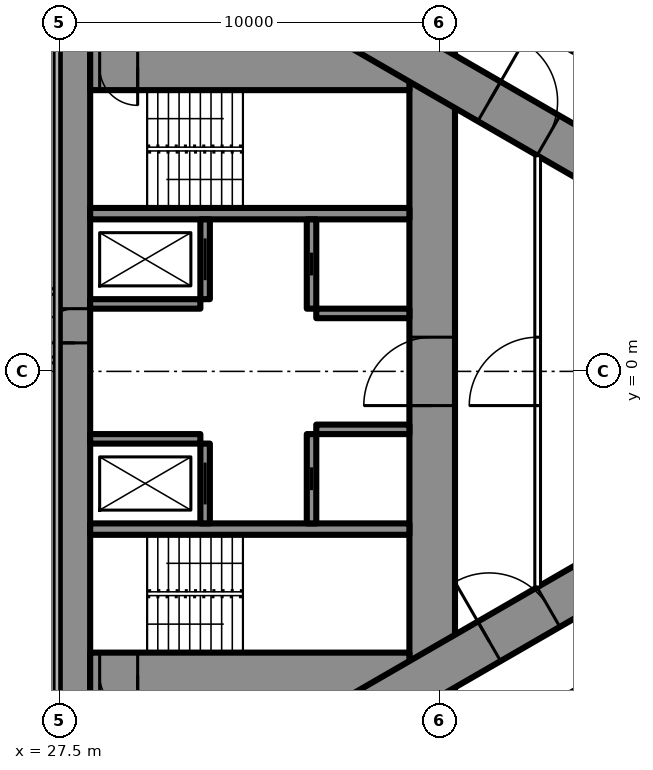
"""IFC4 building model, lengths in metres.
Left out: names, types, materials, properties, quantities, classifications, styles, units other than length and angle.
Written with IfcOpenShell. Run it as: python <this file> out.ifc"""

import sys

from ifc_helpers import new_model, si_unit, direction, frame, frame_2d, origin, place, context, subcontext, project, spatial, rectangle, extrude, element, fill, save


model = new_model("IFC4")
c1 = context("Model", 3, precision=1e-05, world=origin(), true_north=direction((0.0, 1.0)))
c2 = subcontext(c1, "Body", "Model", "MODEL_VIEW")
j1 = project(units=[si_unit("LENGTHUNIT", "METRE"), si_unit("PLANEANGLEUNIT", "RADIAN")], contexts=[c1])
p1 = place(None, origin())
s1 = spatial("IfcSite", under=j1, at=p1, CompositionType="ELEMENT")
p2 = place(p1, origin())
s2 = spatial("IfcBuilding", under=s1, at=p2, CompositionType="ELEMENT")
p3 = place(p2, frame((0.0, 0.0, 226.1)))
s3 = spatial("IfcBuildingStorey", under=s2, at=p3, CompositionType="ELEMENT", Elevation=226.1)
p4 = place(p3, frame((27.9, -8.6, 0.0), z_axis=(0.0, 0.0, 1.0), x_axis=(0.0, 1.0, 0.0)))
e1 = element("IfcWall", 1, at=p4, inside=s3, PredefinedType="SHEAR", context=c2, shape_type="SweptSolid", body=[
    extrude(rectangle(XDim=17.2, YDim=0.8, at=frame_2d((8.6, 0.0))), origin(), (0.0, 0.0, 1.0), 3.6),
])
p5 = place(p4, frame((9.35, 0.0, 0.0)))
e2 = element("IfcOpeningElement", 2, at=p5, cuts=e1, PredefinedType="OPENING", context=c2, shape_type="SweptSolid", body=[
    extrude(rectangle(XDim=0.9, YDim=2.2, at=frame_2d((0.45, 1.1))), frame((0.0, 0.41, 0.0), z_axis=(0.0, -1.0, 0.0), x_axis=(1.0, 0.0, 0.0)), (0.0, 0.0, 1.0), 0.82),
])
p6 = place(p3, frame((37.3, -8.6, 0.0), z_axis=(0.0, 0.0, 1.0), x_axis=(0.0, 1.0, 0.0)))
e3 = element("IfcWall", 3, at=p6, inside=s3, PredefinedType="SHEAR", context=c2, shape_type="SweptSolid", body=[
    extrude(rectangle(XDim=17.2, YDim=1.2, at=frame_2d((8.6, 0.0))), origin(), (0.0, 0.0, 1.0), 3.6),
])
p7 = place(p6, frame((7.7, 0.0, 0.0)))
e4 = element("IfcOpeningElement", 4, at=p7, cuts=e3, PredefinedType="OPENING", context=c2, shape_type="SweptSolid", body=[
    extrude(rectangle(XDim=1.8, YDim=2.2, at=frame_2d((0.9, 1.1))), frame((0.0, 0.61, 0.0), z_axis=(0.0, -1.0, 0.0), x_axis=(1.0, 0.0, 0.0)), (0.0, 0.0, 1.0), 1.22),
])
p8 = place(p3, frame((28.3, -8.0, 0.0), z_axis=(0.0, 0.0, 1.0), x_axis=(1.0, 0.0, 0.0)))
e5 = element("IfcWall", 5, at=p8, inside=s3, PredefinedType="SHEAR", context=c2, shape_type="SweptSolid", body=[
    extrude(rectangle(XDim=8.4, YDim=1.2, at=frame_2d((4.2, 0.0))), origin(), (0.0, 0.0, 1.0), 3.6),
])
p9 = place(p8, frame((0.25, 0.0, 0.0)))
e6 = element("IfcOpeningElement", 6, at=p9, cuts=e5, PredefinedType="OPENING", context=c2, shape_type="SweptSolid", body=[
    extrude(rectangle(XDim=1.0, YDim=2.2, at=frame_2d((0.5, 1.1))), frame((0.0, 0.61, 0.0), z_axis=(0.0, -1.0, 0.0), x_axis=(1.0, 0.0, 0.0)), (0.0, 0.0, 1.0), 1.22),
])
p10 = place(p3, frame((28.3, 8.0, 0.0), z_axis=(0.0, 0.0, 1.0), x_axis=(1.0, 0.0, 0.0)))
e7 = element("IfcWall", 7, at=p10, inside=s3, PredefinedType="SHEAR", context=c2, shape_type="SweptSolid", body=[
    extrude(rectangle(XDim=8.4, YDim=1.2, at=frame_2d((4.2, 0.0))), origin(), (0.0, 0.0, 1.0), 3.6),
])
p11 = place(p10, frame((0.25, 0.0, 0.0)))
e8 = element("IfcOpeningElement", 8, at=p11, cuts=e7, PredefinedType="OPENING", context=c2, shape_type="SweptSolid", body=[
    extrude(rectangle(XDim=1.0, YDim=2.2, at=frame_2d((0.5, 1.1))), frame((0.0, 0.61, 0.0), z_axis=(0.0, -1.0, 0.0), x_axis=(1.0, 0.0, 0.0)), (0.0, 0.0, 1.0), 1.22),
])
for number, where, z_axis, x_axis in (
    (9, (28.3, -4.15, 0.0), (0.0, 0.0, 1.0), (1.0, 0.0, 0.0)),
    (10, (28.3, 4.15, 0.0), (0.0, 0.0, 1.0), (1.0, 0.0, 0.0)),
):
    element("IfcWall", number, at=place(p3, frame(where, z_axis=z_axis, x_axis=x_axis)), inside=s3, PredefinedType="SHEAR", context=c2, shape_type="SweptSolid", body=[
        extrude(rectangle(XDim=8.4, YDim=0.3, at=frame_2d((4.2, 0.0))), origin(), (0.0, 0.0, 1.0), 3.6),
    ])
p12 = place(p3, frame((31.325, -4.0, 0.0), z_axis=(0.0, 0.0, 1.0), x_axis=(0.0, 1.0, 0.0)))
e11 = element("IfcWall", 11, at=p12, inside=s3, PredefinedType="SHEAR", context=c2, shape_type="SweptSolid", body=[
    extrude(rectangle(XDim=2.1, YDim=0.25, at=frame_2d((1.05, 0.0))), origin(), (0.0, 0.0, 1.0), 3.6),
])
p13 = place(p12, frame((0.5, 0.0, 0.0)))
e12 = element("IfcOpeningElement", 12, at=p13, cuts=e11, PredefinedType="OPENING", context=c2, shape_type="SweptSolid", body=[
    extrude(rectangle(XDim=1.1, YDim=2.2, at=frame_2d((0.55, 1.1))), frame((0.0, 0.135, 0.0), z_axis=(0.0, -1.0, 0.0), x_axis=(1.0, 0.0, 0.0)), (0.0, 0.0, 1.0), 0.27),
])
p14 = place(p3, frame((34.125, -4.0, 0.0), z_axis=(0.0, 0.0, 1.0), x_axis=(0.0, 1.0, 0.0)))
e13 = element("IfcWall", 13, at=p14, inside=s3, PredefinedType="SHEAR", context=c2, shape_type="SweptSolid", body=[
    extrude(rectangle(XDim=2.35, YDim=0.25, at=frame_2d((1.175, 0.0))), origin(), (0.0, 0.0, 1.0), 3.6),
])
p15 = place(p14, frame((0.875, 0.0, 0.0)))
e14 = element("IfcOpeningElement", 14, at=p15, cuts=e13, PredefinedType="OPENING", context=c2, shape_type="SweptSolid", body=[
    extrude(rectangle(XDim=0.6, YDim=2.0, at=frame_2d((0.3, 1.0))), frame((0.0, 0.135, 0.0), z_axis=(0.0, -1.0, 0.0), x_axis=(1.0, 0.0, 0.0)), (0.0, 0.0, 1.0), 0.27),
])
p16 = place(p3, frame((28.3, -1.775, 0.0), z_axis=(0.0, 0.0, 1.0), x_axis=(1.0, 0.0, 0.0)))
e15 = element("IfcWall", 15, at=p16, inside=s3, PredefinedType="SHEAR", context=c2, shape_type="SweptSolid", body=[
    extrude(rectangle(XDim=2.9, YDim=0.25, at=frame_2d((1.45, 0.0))), origin(), (0.0, 0.0, 1.0), 3.6),
])
p17 = place(p3, frame((34.25, -1.525, 0.0), z_axis=(0.0, 0.0, 1.0), x_axis=(1.0, 0.0, 0.0)))
e16 = element("IfcWall", 16, at=p17, inside=s3, PredefinedType="SHEAR", context=c2, shape_type="SweptSolid", body=[
    extrude(rectangle(XDim=2.45, YDim=0.25, at=frame_2d((1.225, 0.0))), origin(), (0.0, 0.0, 1.0), 3.6),
])
p18 = place(p3, frame((31.325, 1.9, 0.0), z_axis=(0.0, 0.0, 1.0), x_axis=(0.0, 1.0, 0.0)))
e17 = element("IfcWall", 17, at=p18, inside=s3, PredefinedType="SHEAR", context=c2, shape_type="SweptSolid", body=[
    extrude(rectangle(XDim=2.1, YDim=0.25, at=frame_2d((1.05, 0.0))), origin(), (0.0, 0.0, 1.0), 3.6),
])
p19 = place(p18, frame((0.5, 0.0, 0.0)))
e18 = element("IfcOpeningElement", 18, at=p19, cuts=e17, PredefinedType="OPENING", context=c2, shape_type="SweptSolid", body=[
    extrude(rectangle(XDim=1.1, YDim=2.2, at=frame_2d((0.55, 1.1))), frame((0.0, 0.135, 0.0), z_axis=(0.0, -1.0, 0.0), x_axis=(1.0, 0.0, 0.0)), (0.0, 0.0, 1.0), 0.27),
])
p20 = place(p3, frame((34.125, 1.65, 0.0), z_axis=(0.0, 0.0, 1.0), x_axis=(0.0, 1.0, 0.0)))
e19 = element("IfcWall", 19, at=p20, inside=s3, PredefinedType="SHEAR", context=c2, shape_type="SweptSolid", body=[
    extrude(rectangle(XDim=2.35, YDim=0.25, at=frame_2d((1.175, 0.0))), origin(), (0.0, 0.0, 1.0), 3.6),
])
p21 = place(p20, frame((0.875, 0.0, 0.0)))
e20 = element("IfcOpeningElement", 20, at=p21, cuts=e19, PredefinedType="OPENING", context=c2, shape_type="SweptSolid", body=[
    extrude(rectangle(XDim=0.6, YDim=2.0, at=frame_2d((0.3, 1.0))), frame((0.0, 0.135, 0.0), z_axis=(0.0, -1.0, 0.0), x_axis=(1.0, 0.0, 0.0)), (0.0, 0.0, 1.0), 0.27),
])
p22 = place(p3, frame((28.3, 1.775, 0.0), z_axis=(0.0, 0.0, 1.0), x_axis=(1.0, 0.0, 0.0)))
e21 = element("IfcWall", 21, at=p22, inside=s3, PredefinedType="SHEAR", context=c2, shape_type="SweptSolid", body=[
    extrude(rectangle(XDim=2.9, YDim=0.25, at=frame_2d((1.45, 0.0))), origin(), (0.0, 0.0, 1.0), 3.6),
])
p23 = place(p3, frame((34.25, 1.525, 0.0), z_axis=(0.0, 0.0, 1.0), x_axis=(1.0, 0.0, 0.0)))
e22 = element("IfcWall", 22, at=p23, inside=s3, PredefinedType="SHEAR", context=c2, shape_type="SweptSolid", body=[
    extrude(rectangle(XDim=2.45, YDim=0.25, at=frame_2d((1.225, 0.0))), origin(), (0.0, 0.0, 1.0), 3.6),
])
p24 = place(p3, frame((27.2, -13.8, 0.0), z_axis=(0.0, 0.0, 1.0), x_axis=(0.866027159892, 0.499996958321, 0.0)))
e23 = element("IfcWall", 23, at=p24, inside=s3, PredefinedType="SHEAR", context=c2, shape_type="SweptSolid", body=[
    extrude(rectangle(XDim=27.947, YDim=1.2, at=frame_2d((13.973, 0.0))), origin(), (0.0, 0.0, 1.0), 3.6),
])
p25 = place(p24, frame((4.6, 0.0, 0.0)))
e24 = element("IfcOpeningElement", 24, at=p25, cuts=e23, PredefinedType="OPENING", context=c2, shape_type="SweptSolid", body=[
    extrude(rectangle(XDim=1.0, YDim=2.2, at=frame_2d((0.5, 1.1))), frame((0.0, 0.61, 0.0), z_axis=(0.0, -1.0, 0.0), x_axis=(1.0, 0.0, 0.0)), (0.0, 0.0, 1.0), 1.22),
])
p26 = place(p24, frame((13.395, 0.0, 0.0)))
e25 = element("IfcOpeningElement", 25, at=p26, cuts=e23, PredefinedType="OPENING", context=c2, shape_type="SweptSolid", body=[
    extrude(rectangle(XDim=1.8, YDim=2.2, at=frame_2d((0.9, 1.1))), frame((0.0, 0.61, 0.0), z_axis=(0.0, -1.0, 0.0), x_axis=(1.0, 0.0, 0.0)), (0.0, 0.0, 1.0), 1.22),
])
p27 = place(p3, frame((27.2, 13.8, 0.0), z_axis=(0.0, 0.0, 1.0), x_axis=(0.866024515034, -0.500001539357, 0.0)))
e26 = element("IfcWall", 26, at=p27, inside=s3, PredefinedType="SHEAR", context=c2, shape_type="SweptSolid", body=[
    extrude(rectangle(XDim=26.907, YDim=1.2, at=frame_2d((13.454, 0.0))), origin(), (0.0, 0.0, 1.0), 3.6),
])
p28 = place(p27, frame((4.6, 0.0, 0.0)))
e27 = element("IfcOpeningElement", 27, at=p28, cuts=e26, PredefinedType="OPENING", context=c2, shape_type="SweptSolid", body=[
    extrude(rectangle(XDim=1.0, YDim=2.2, at=frame_2d((0.5, 1.1))), frame((0.0, 0.61, 0.0), z_axis=(0.0, -1.0, 0.0), x_axis=(1.0, 0.0, 0.0)), (0.0, 0.0, 1.0), 1.22),
])
p29 = place(p27, frame((13.395, 0.0, 0.0)))
e28 = element("IfcOpeningElement", 28, at=p29, cuts=e26, PredefinedType="OPENING", context=c2, shape_type="SweptSolid", body=[
    extrude(rectangle(XDim=1.8, YDim=2.2, at=frame_2d((0.9, 1.1))), frame((0.0, 0.61, 0.0), z_axis=(0.0, -1.0, 0.0), x_axis=(1.0, 0.0, 0.0)), (0.0, 0.0, 1.0), 1.22),
])
p30 = place(p3, frame((28.959, 15.44, 0.0), z_axis=(0.0, 0.0, 1.0), x_axis=(0.866028936079, -0.499993881836, 0.0)))
e29 = element("IfcWall", 29, at=p30, inside=s3, PredefinedType="PARTITIONING", context=c2, shape_type="SweptSolid", body=[
    extrude(rectangle(XDim=20.503, YDim=0.2, at=frame_2d((10.251, 0.0))), origin(), (0.0, 0.0, 1.0), 3.35),
])
p31 = place(p30, frame((16.137, 0.0, 0.0)))
e30 = element("IfcOpeningElement", 30, at=p31, cuts=e29, PredefinedType="OPENING", context=c2, shape_type="SweptSolid", body=[
    extrude(rectangle(XDim=0.95, YDim=2.2, at=frame_2d((0.475, 1.1))), frame((0.0, 0.11, 0.0), z_axis=(0.0, -1.0, 0.0), x_axis=(1.0, 0.0, 0.0)), (0.0, 0.0, 1.0), 0.22),
])
p32 = place(p30, frame((14.437, 0.0, 0.0)))
e31 = element("IfcOpeningElement", 31, at=p32, cuts=e29, PredefinedType="OPENING", context=c2, shape_type="SweptSolid", body=[
    extrude(rectangle(XDim=0.95, YDim=2.2, at=frame_2d((0.475, 1.1))), frame((0.0, 0.11, 0.0), z_axis=(0.0, -1.0, 0.0), x_axis=(1.0, 0.0, 0.0)), (0.0, 0.0, 1.0), 0.22),
])
p33 = place(p30, frame((2.244, 0.0, 0.0)))
e32 = element("IfcOpeningElement", 32, at=p33, cuts=e29, PredefinedType="OPENING", context=c2, shape_type="SweptSolid", body=[
    extrude(rectangle(XDim=1.8, YDim=2.04, at=frame_2d((0.9, 1.02))), frame((0.0, 0.11, 0.0), z_axis=(0.0, -1.0, 0.0), x_axis=(1.0, 0.0, 0.0)), (0.0, 0.0, 1.0), 0.22),
])
p34 = place(p3, frame((28.959, -15.44, 0.0), z_axis=(0.0, 0.0, 1.0), x_axis=(0.866025204199, 0.500000345692, 0.0)))
e33 = element("IfcWall", 33, at=p34, inside=s3, PredefinedType="PARTITIONING", context=c2, shape_type="SweptSolid", body=[
    extrude(rectangle(XDim=19.646, YDim=0.2, at=frame_2d((9.823, 0.0))), origin(), (0.0, 0.0, 1.0), 3.35),
])
p35 = place(p34, frame((1.494, 0.0, 0.0)))
e34 = element("IfcOpeningElement", 34, at=p35, cuts=e33, PredefinedType="OPENING", context=c2, shape_type="SweptSolid", body=[
    extrude(rectangle(XDim=1.8, YDim=2.04, at=frame_2d((0.9, 1.02))), frame((0.0, 0.11, 0.0), z_axis=(0.0, -1.0, 0.0), x_axis=(1.0, 0.0, 0.0)), (0.0, 0.0, 1.0), 0.22),
])
p36 = place(p34, frame((7.687, 0.0, 0.0)))
e35 = element("IfcOpeningElement", 35, at=p36, cuts=e33, PredefinedType="OPENING", context=c2, shape_type="SweptSolid", body=[
    extrude(rectangle(XDim=1.0, YDim=2.2, at=frame_2d((0.5, 1.1))), frame((0.0, 0.11, 0.0), z_axis=(0.0, -1.0, 0.0), x_axis=(1.0, 0.0, 0.0)), (0.0, 0.0, 1.0), 0.22),
])
p37 = place(p34, frame((18.321, 0.0, 0.0)))
e36 = element("IfcOpeningElement", 36, at=p37, cuts=e33, PredefinedType="OPENING", context=c2, shape_type="SweptSolid", body=[
    extrude(rectangle(XDim=0.95, YDim=2.2, at=frame_2d((0.475, 1.1))), frame((0.0, 0.11, 0.0), z_axis=(0.0, -1.0, 0.0), x_axis=(1.0, 0.0, 0.0)), (0.0, 0.0, 1.0), 0.22),
])
p38 = place(p3, frame((40.075, -5.674, 0.0), z_axis=(0.0, 0.0, 1.0), x_axis=(0.0, 1.0, 0.0)))
e37 = element("IfcWall", 37, at=p38, inside=s3, PredefinedType="PARTITIONING", context=c2, shape_type="SweptSolid", body=[
    extrude(rectangle(XDim=11.348, YDim=0.15, at=frame_2d((5.674, 0.0))), origin(), (0.0, 0.0, 1.0), 3.35),
])
p39 = place(p38, frame((4.774, 0.0, 0.0)))
e38 = element("IfcOpeningElement", 38, at=p39, cuts=e37, PredefinedType="OPENING", context=c2, shape_type="SweptSolid", body=[
    extrude(rectangle(XDim=1.8, YDim=2.2, at=frame_2d((0.9, 1.1))), frame((0.0, 0.085, 0.0), z_axis=(0.0, -1.0, 0.0), x_axis=(1.0, 0.0, 0.0)), (0.0, 0.0, 1.0), 0.17),
])
p40 = place(p3, frame((-27.5, 0.3, 0.0), z_axis=(0.0, 0.0, 1.0), x_axis=(1.0, 0.0, 0.0)))
e39 = element("IfcWall", 39, at=p40, inside=s3, PredefinedType="PARTITIONING", context=c2, shape_type="SweptSolid", body=[
    extrude(rectangle(XDim=55.0, YDim=0.15, at=frame_2d((27.5, 0.0))), origin(), (0.0, 0.0, 1.0), 2.4),
])
p41 = place(p40, frame((1.575, 0.0, 0.0)))
e40 = element("IfcOpeningElement", 40, at=p41, cuts=e39, PredefinedType="OPENING", context=c2, shape_type="SweptSolid", body=[
    extrude(rectangle(XDim=1.0, YDim=2.2, at=frame_2d((0.5, 1.1))), frame((0.0, 0.085, 0.0), z_axis=(0.0, -1.0, 0.0), x_axis=(1.0, 0.0, 0.0)), (0.0, 0.0, 1.0), 0.17),
])
p42 = place(p40, frame((7.525, 0.0, 0.0)))
e41 = element("IfcOpeningElement", 41, at=p42, cuts=e39, PredefinedType="OPENING", context=c2, shape_type="SweptSolid", body=[
    extrude(rectangle(XDim=1.05, YDim=2.4, at=frame_2d((0.525, 1.2))), frame((0.0, 0.085, 0.0), z_axis=(0.0, -1.0, 0.0), x_axis=(1.0, 0.0, 0.0)), (0.0, 0.0, 1.0), 0.17),
])
p43 = place(p40, frame((18.525, 0.0, 0.0)))
e42 = element("IfcOpeningElement", 42, at=p43, cuts=e39, PredefinedType="OPENING", context=c2, shape_type="SweptSolid", body=[
    extrude(rectangle(XDim=1.05, YDim=2.4, at=frame_2d((0.525, 1.2))), frame((0.0, 0.085, 0.0), z_axis=(0.0, -1.0, 0.0), x_axis=(1.0, 0.0, 0.0)), (0.0, 0.0, 1.0), 0.17),
])
p44 = place(p40, frame((24.025, 0.0, 0.0)))
e43 = element("IfcOpeningElement", 43, at=p44, cuts=e39, PredefinedType="OPENING", context=c2, shape_type="SweptSolid", body=[
    extrude(rectangle(XDim=1.05, YDim=2.4, at=frame_2d((0.525, 1.2))), frame((0.0, 0.085, 0.0), z_axis=(0.0, -1.0, 0.0), x_axis=(1.0, 0.0, 0.0)), (0.0, 0.0, 1.0), 0.17),
])
p45 = place(p40, frame((35.025, 0.0, 0.0)))
e44 = element("IfcOpeningElement", 44, at=p45, cuts=e39, PredefinedType="OPENING", context=c2, shape_type="SweptSolid", body=[
    extrude(rectangle(XDim=1.05, YDim=2.4, at=frame_2d((0.525, 1.2))), frame((0.0, 0.085, 0.0), z_axis=(0.0, -1.0, 0.0), x_axis=(1.0, 0.0, 0.0)), (0.0, 0.0, 1.0), 0.17),
])
p46 = place(p40, frame((40.525, 0.0, 0.0)))
e45 = element("IfcOpeningElement", 45, at=p46, cuts=e39, PredefinedType="OPENING", context=c2, shape_type="SweptSolid", body=[
    extrude(rectangle(XDim=1.05, YDim=2.4, at=frame_2d((0.525, 1.2))), frame((0.0, 0.085, 0.0), z_axis=(0.0, -1.0, 0.0), x_axis=(1.0, 0.0, 0.0)), (0.0, 0.0, 1.0), 0.17),
])
p47 = place(p40, frame((52.525, 0.0, 0.0)))
e46 = element("IfcOpeningElement", 46, at=p47, cuts=e39, PredefinedType="OPENING", context=c2, shape_type="SweptSolid", body=[
    extrude(rectangle(XDim=1.05, YDim=2.4, at=frame_2d((0.525, 1.2))), frame((0.0, 0.085, 0.0), z_axis=(0.0, -1.0, 0.0), x_axis=(1.0, 0.0, 0.0)), (0.0, 0.0, 1.0), 0.17),
])
p48 = place(p3, frame((5.85, 2.1, 0.0), z_axis=(0.0, 0.0, 1.0), x_axis=(1.0, 0.0, 0.0)))
e47 = element("IfcWall", 47, at=p48, inside=s3, PredefinedType="PARTITIONING", context=c2, shape_type="SweptSolid", body=[
    extrude(rectangle(XDim=21.65, YDim=0.15, at=frame_2d((10.825, 0.0))), origin(), (0.0, 0.0, 1.0), 3.4),
])
p49 = place(p48, frame((1.675, 0.0, 0.0)))
e48 = element("IfcOpeningElement", 48, at=p49, cuts=e47, PredefinedType="OPENING", context=c2, shape_type="SweptSolid", body=[
    extrude(rectangle(XDim=1.05, YDim=2.4, at=frame_2d((0.525, 1.2))), frame((0.0, 0.085, 0.0), z_axis=(0.0, -1.0, 0.0), x_axis=(1.0, 0.0, 0.0)), (0.0, 0.0, 1.0), 0.17),
])
p50 = place(p48, frame((7.175, 0.0, 0.0)))
e49 = element("IfcOpeningElement", 49, at=p50, cuts=e47, PredefinedType="OPENING", context=c2, shape_type="SweptSolid", body=[
    extrude(rectangle(XDim=1.05, YDim=2.4, at=frame_2d((0.525, 1.2))), frame((0.0, 0.085, 0.0), z_axis=(0.0, -1.0, 0.0), x_axis=(1.0, 0.0, 0.0)), (0.0, 0.0, 1.0), 0.17),
])
p51 = place(p48, frame((19.175, 0.0, 0.0)))
e50 = element("IfcOpeningElement", 50, at=p51, cuts=e47, PredefinedType="OPENING", context=c2, shape_type="SweptSolid", body=[
    extrude(rectangle(XDim=1.05, YDim=2.4, at=frame_2d((0.525, 1.2))), frame((0.0, 0.085, 0.0), z_axis=(0.0, -1.0, 0.0), x_axis=(1.0, 0.0, 0.0)), (0.0, 0.0, 1.0), 0.17),
])
p52 = place(p39, origin())
e51 = element("IfcDoor", 51, at=p52, inside=s3, OperationType="DOUBLE_DOOR_SINGLE_SWING", PredefinedType="DOOR", context=c2, shape_type="SweptSolid", body=[
    extrude(rectangle(XDim=1.8, YDim=2.2, at=frame_2d((0.9, 1.1))), frame((0.0, 0.025, 0.0), z_axis=(0.0, -1.0, 0.0), x_axis=(1.0, 0.0, 0.0)), (0.0, 0.0, 1.0), 0.05),
])
fill(e38, e51)
p53 = place(p26, origin())
e52 = element("IfcDoor", 52, at=p53, inside=s3, OperationType="DOUBLE_DOOR_SINGLE_SWING", PredefinedType="DOOR", context=c2, shape_type="SweptSolid", body=[
    extrude(rectangle(XDim=1.8, YDim=2.2, at=frame_2d((0.9, 1.1))), frame((0.0, 0.025, 0.0), z_axis=(0.0, -1.0, 0.0), x_axis=(1.0, 0.0, 0.0)), (0.0, 0.0, 1.0), 0.05),
])
fill(e25, e52)
p54 = place(p29, origin())
e53 = element("IfcDoor", 53, at=p54, inside=s3, OperationType="DOUBLE_DOOR_SINGLE_SWING", PredefinedType="DOOR", context=c2, shape_type="SweptSolid", body=[
    extrude(rectangle(XDim=1.8, YDim=2.2, at=frame_2d((0.9, 1.1))), frame((0.0, 0.025, 0.0), z_axis=(0.0, -1.0, 0.0), x_axis=(1.0, 0.0, 0.0)), (0.0, 0.0, 1.0), 0.05),
])
fill(e28, e53)
p55 = place(p7, origin())
e54 = element("IfcDoor", 54, at=p55, inside=s3, OperationType="DOUBLE_DOOR_SINGLE_SWING", PredefinedType="DOOR", context=c2, shape_type="SweptSolid", body=[
    extrude(rectangle(XDim=1.8, YDim=2.2, at=frame_2d((0.9, 1.1))), frame((0.0, 0.025, 0.0), z_axis=(0.0, -1.0, 0.0), x_axis=(1.0, 0.0, 0.0)), (0.0, 0.0, 1.0), 0.05),
])
fill(e4, e54)
p56 = place(p9, origin())
e55 = element("IfcDoor", 55, at=p56, inside=s3, OperationType="SINGLE_SWING_RIGHT", PredefinedType="DOOR", context=c2, shape_type="SweptSolid", body=[
    extrude(rectangle(XDim=1.0, YDim=2.2, at=frame_2d((0.5, 1.1))), frame((0.0, 0.025, 0.0), z_axis=(0.0, -1.0, 0.0), x_axis=(1.0, 0.0, 0.0)), (0.0, 0.0, 1.0), 0.05),
])
fill(e6, e55)
p57 = place(p11, origin())
e56 = element("IfcDoor", 56, at=p57, inside=s3, OperationType="SINGLE_SWING_RIGHT", PredefinedType="DOOR", context=c2, shape_type="SweptSolid", body=[
    extrude(rectangle(XDim=1.0, YDim=2.2, at=frame_2d((0.5, 1.1))), frame((0.0, 0.025, 0.0), z_axis=(0.0, -1.0, 0.0), x_axis=(1.0, 0.0, 0.0)), (0.0, 0.0, 1.0), 0.05),
])
fill(e8, e56)
p58 = place(p5, origin())
e57 = element("IfcDoor", 57, at=p58, inside=s3, OperationType="SINGLE_SWING_LEFT", PredefinedType="DOOR", context=c2, shape_type="SweptSolid", body=[
    extrude(rectangle(XDim=0.9, YDim=2.2, at=frame_2d((0.45, 1.1))), frame((0.0, 0.025, 0.0), z_axis=(0.0, -1.0, 0.0), x_axis=(1.0, 0.0, 0.0)), (0.0, 0.0, 1.0), 0.05),
])
fill(e2, e57)
p59 = place(p13, origin())
e58 = element("IfcDoor", 58, at=p59, inside=s3, OperationType="SLIDING_TO_LEFT", PredefinedType="USERDEFINED", context=c2, shape_type="SweptSolid", body=[
    extrude(rectangle(XDim=1.1, YDim=2.2, at=frame_2d((0.55, 1.1))), frame((0.0, 0.025, 0.0), z_axis=(0.0, -1.0, 0.0), x_axis=(1.0, 0.0, 0.0)), (0.0, 0.0, 1.0), 0.05),
])
fill(e12, e58)
p60 = place(p19, origin())
e59 = element("IfcDoor", 59, at=p60, inside=s3, OperationType="SLIDING_TO_LEFT", PredefinedType="USERDEFINED", context=c2, shape_type="SweptSolid", body=[
    extrude(rectangle(XDim=1.1, YDim=2.2, at=frame_2d((0.55, 1.1))), frame((0.0, 0.025, 0.0), z_axis=(0.0, -1.0, 0.0), x_axis=(1.0, 0.0, 0.0)), (0.0, 0.0, 1.0), 0.05),
])
fill(e18, e59)
p61 = place(p15, origin())
e60 = element("IfcDoor", 60, at=p61, inside=s3, OperationType="SLIDING_TO_LEFT", PredefinedType="DOOR", context=c2, shape_type="SweptSolid", body=[
    extrude(rectangle(XDim=0.6, YDim=2.0, at=frame_2d((0.3, 1.0))), frame((0.0, 0.025, 0.0), z_axis=(0.0, -1.0, 0.0), x_axis=(1.0, 0.0, 0.0)), (0.0, 0.0, 1.0), 0.05),
])
fill(e14, e60)
p62 = place(p21, origin())
e61 = element("IfcDoor", 61, at=p62, inside=s3, OperationType="SLIDING_TO_LEFT", PredefinedType="DOOR", context=c2, shape_type="SweptSolid", body=[
    extrude(rectangle(XDim=0.6, YDim=2.0, at=frame_2d((0.3, 1.0))), frame((0.0, 0.025, 0.0), z_axis=(0.0, -1.0, 0.0), x_axis=(1.0, 0.0, 0.0)), (0.0, 0.0, 1.0), 0.05),
])
fill(e20, e61)
save(model, sys.argv[1])
